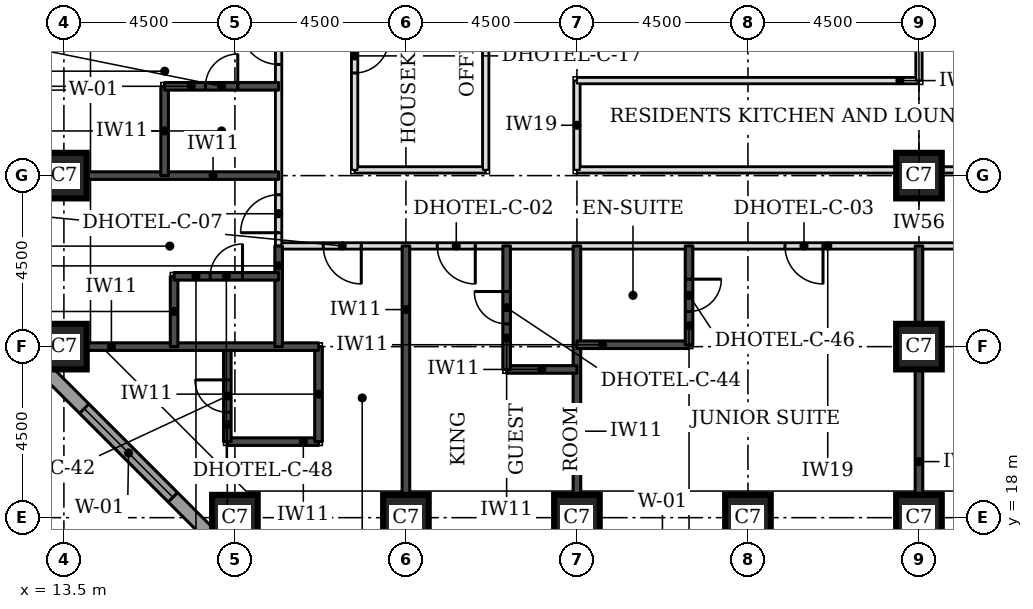
"""IFC4 building model, lengths in metres.
Left out: names, types, materials, properties, quantities, classifications, styles, units other than length and angle.
Written with IfcOpenShell. Run it as: python <this file> out.ifc"""

import sys

from ifc_helpers import new_model, si_unit, direction, frame, frame_2d, origin, origin_2d, place, context, subcontext, project, spatial, rectangle, extrude, element, fill, save


model = new_model("IFC4")
c1 = context("Model", 3, precision=1e-05, world=origin(), true_north=direction((0.0, 1.0)))
c2 = subcontext(c1, "Body", "Model", "MODEL_VIEW")
j1 = project(units=[si_unit("LENGTHUNIT", "METRE"), si_unit("PLANEANGLEUNIT", "RADIAN")], contexts=[c1])
p1 = place(None, origin())
s1 = spatial("IfcSite", under=j1, at=p1, CompositionType="ELEMENT")
p2 = place(p1, origin())
s2 = spatial("IfcBuilding", under=s1, at=p2, CompositionType="ELEMENT")
p3 = place(p2, frame((0.0, 0.0, 33.0)))
s3 = spatial("IfcBuildingStorey", under=s2, at=p3, CompositionType="ELEMENT", Elevation=33.0)
for number, where, z_axis, x_axis in (
    (1, (18.0, 18.0, 0.0), (0.0, 0.0, 1.0), (1.0, 0.0, 0.0)),
    (2, (22.5, 18.0, 0.0), (0.0, 0.0, 1.0), (1.0, 0.0, 0.0)),
    (3, (27.0, 18.0, 0.0), (0.0, 0.0, 1.0), (1.0, 0.0, 0.0)),
    (4, (31.5, 18.0, 0.0), (0.0, 0.0, 1.0), (1.0, 0.0, 0.0)),
    (5, (36.0, 18.0, 0.0), (0.0, 0.0, 1.0), (1.0, 0.0, 0.0)),
    (6, (13.5, 22.5, 0.0), (0.0, 0.0, 1.0), (1.0, 0.0, 0.0)),
    (7, (36.0, 22.5, 0.0), (0.0, 0.0, 1.0), (1.0, 0.0, 0.0)),
    (8, (13.5, 27.0, 0.0), (0.0, 0.0, 1.0), (1.0, 0.0, 0.0)),
    (9, (36.0, 27.0, 0.0), (0.0, 0.0, 1.0), (1.0, 0.0, 0.0)),
):
    element("IfcColumn", number, at=place(p3, frame(where, z_axis=z_axis, x_axis=x_axis)), inside=s3, PredefinedType="COLUMN", context=c2, shape_type="SweptSolid", body=[
        extrude(rectangle(XDim=1.2, YDim=1.2, at=origin_2d()), origin(), (0.0, 0.0, 1.0), 3.3),
    ])
p4 = place(p3, frame((12.674, 22.23, 0.0), z_axis=(0.0, 0.0, 1.0), x_axis=(0.707106781187, -0.707106781187, 0.0)))
e10 = element("IfcWall", 10, at=p4, inside=s3, PredefinedType="STANDARD", context=c2, shape_type="SweptSolid", body=[
    extrude(rectangle(XDim=7.151, YDim=0.35, at=frame_2d((3.576, 0.0))), origin(), (0.0, 0.0, 1.0), 3.055),
])
p5 = place(p4, frame((1.926, 0.0, 0.8)))
e11 = element("IfcOpeningElement", 11, at=p5, cuts=e10, PredefinedType="OPENING", context=c2, shape_type="SweptSolid", body=[
    extrude(rectangle(XDim=3.3, YDim=1.5, at=frame_2d((1.65, 0.75))), frame((0.0, 0.185, 0.0), z_axis=(0.0, -1.0, 0.0), x_axis=(1.0, 0.0, 0.0)), (0.0, 0.0, 1.0), 0.37),
])
p6 = place(p3, frame((19.15, 25.15, 0.0), z_axis=(0.0, 0.0, 1.0), x_axis=(1.0, 0.0, 0.0)))
e12 = element("IfcWall", 12, at=p6, inside=s3, PredefinedType="PARTITIONING", context=c2, shape_type="SweptSolid", body=[
    extrude(rectangle(XDim=33.7, YDim=0.15, at=frame_2d((16.85, 0.0))), origin(), (0.0, 0.0, 1.0), 3.08),
])
p7 = place(p6, frame((4.175, 0.0, 0.0)))
e13 = element("IfcOpeningElement", 13, at=p7, cuts=e12, PredefinedType="OPENING", context=c2, shape_type="SweptSolid", body=[
    extrude(rectangle(XDim=1.0, YDim=2.1, at=frame_2d((0.5, 1.05))), frame((0.0, 0.085, 0.0), z_axis=(0.0, -1.0, 0.0), x_axis=(1.0, 0.0, 0.0)), (0.0, 0.0, 1.0), 0.17),
])
p8 = place(p6, frame((13.325, 0.0, 0.0)))
e14 = element("IfcOpeningElement", 14, at=p8, cuts=e12, PredefinedType="OPENING", context=c2, shape_type="SweptSolid", body=[
    extrude(rectangle(XDim=1.0, YDim=2.1, at=frame_2d((0.5, 1.05))), frame((0.0, 0.085, 0.0), z_axis=(0.0, -1.0, 0.0), x_axis=(1.0, 0.0, 0.0)), (0.0, 0.0, 1.0), 0.17),
])
p9 = place(p6, frame((19.625, 0.0, 0.0)))
e15 = element("IfcOpeningElement", 15, at=p9, cuts=e12, PredefinedType="OPENING", context=c2, shape_type="SweptSolid", body=[
    extrude(rectangle(XDim=1.0, YDim=2.1, at=frame_2d((0.5, 1.05))), frame((0.0, 0.085, 0.0), z_axis=(0.0, -1.0, 0.0), x_axis=(1.0, 0.0, 0.0)), (0.0, 0.0, 1.0), 0.17),
])
p10 = place(p6, frame((28.775, 0.0, 0.0)))
e16 = element("IfcOpeningElement", 16, at=p10, cuts=e12, PredefinedType="OPENING", context=c2, shape_type="SweptSolid", body=[
    extrude(rectangle(XDim=1.0, YDim=2.1, at=frame_2d((0.5, 1.05))), frame((0.0, 0.085, 0.0), z_axis=(0.0, -1.0, 0.0), x_axis=(1.0, 0.0, 0.0)), (0.0, 0.0, 1.0), 0.17),
])
p11 = place(p6, frame((1.175, 0.0, 0.0)))
e17 = element("IfcOpeningElement", 17, at=p11, cuts=e12, PredefinedType="OPENING", context=c2, shape_type="SweptSolid", body=[
    extrude(rectangle(XDim=1.0, YDim=2.1, at=frame_2d((0.5, 1.05))), frame((0.0, 0.085, 0.0), z_axis=(0.0, -1.0, 0.0), x_axis=(1.0, 0.0, 0.0)), (0.0, 0.0, 1.0), 0.17),
])
p12 = place(p6, frame((31.525, 0.0, 0.0)))
e18 = element("IfcOpeningElement", 18, at=p12, cuts=e12, PredefinedType="OPENING", context=c2, shape_type="SweptSolid", body=[
    extrude(rectangle(XDim=1.0, YDim=2.1, at=frame_2d((0.5, 1.05))), frame((0.0, 0.085, 0.0), z_axis=(0.0, -1.0, 0.0), x_axis=(1.0, 0.0, 0.0)), (0.0, 0.0, 1.0), 0.17),
])
p13 = place(p3, frame((19.15, 25.15, 0.0), z_axis=(0.0, 0.0, 1.0), x_axis=(0.0, 1.0, 0.0)))
e19 = element("IfcWall", 19, at=p13, inside=s3, PredefinedType="PARTITIONING", context=c2, shape_type="SweptSolid", body=[
    extrude(rectangle(XDim=24.35, YDim=0.15, at=frame_2d((12.175, 0.0))), origin(), (0.0, 0.0, 1.0), 3.08),
])
p14 = place(p13, frame((0.347, 0.0, 0.0)))
e20 = element("IfcOpeningElement", 20, at=p14, cuts=e19, PredefinedType="OPENING", context=c2, shape_type="SweptSolid", body=[
    extrude(rectangle(XDim=1.0, YDim=2.1, at=frame_2d((0.5, 1.05))), frame((0.0, 0.085, 0.0), z_axis=(0.0, -1.0, 0.0), x_axis=(1.0, 0.0, 0.0)), (0.0, 0.0, 1.0), 0.17),
])
p15 = place(p13, frame((4.775, 0.0, 0.0)))
e21 = element("IfcOpeningElement", 21, at=p15, cuts=e19, PredefinedType="OPENING", context=c2, shape_type="SweptSolid", body=[
    extrude(rectangle(XDim=1.0, YDim=2.1, at=frame_2d((0.5, 1.05))), frame((0.0, 0.085, 0.0), z_axis=(0.0, -1.0, 0.0), x_axis=(1.0, 0.0, 0.0)), (0.0, 0.0, 1.0), 0.17),
])
p16 = place(p13, frame((7.175, 0.0, 0.0)))
e22 = element("IfcOpeningElement", 22, at=p16, cuts=e19, PredefinedType="OPENING", context=c2, shape_type="SweptSolid", body=[
    extrude(rectangle(XDim=1.0, YDim=2.1, at=frame_2d((0.5, 1.05))), frame((0.0, 0.085, 0.0), z_axis=(0.0, -1.0, 0.0), x_axis=(1.0, 0.0, 0.0)), (0.0, 0.0, 1.0), 0.17),
])
p17 = place(p13, frame((13.75, 0.0, 0.0)))
e23 = element("IfcOpeningElement", 23, at=p17, cuts=e19, PredefinedType="OPENING", context=c2, shape_type="SweptSolid", body=[
    extrude(rectangle(XDim=1.0, YDim=2.1, at=frame_2d((0.5, 1.05))), frame((0.0, 0.085, 0.0), z_axis=(0.0, -1.0, 0.0), x_axis=(1.0, 0.0, 0.0)), (0.0, 0.0, 1.0), 0.17),
])
p18 = place(p13, frame((16.175, 0.0, 0.0)))
e24 = element("IfcOpeningElement", 24, at=p18, cuts=e19, PredefinedType="OPENING", context=c2, shape_type="SweptSolid", body=[
    extrude(rectangle(XDim=1.0, YDim=2.1, at=frame_2d((0.5, 1.05))), frame((0.0, 0.085, 0.0), z_axis=(0.0, -1.0, 0.0), x_axis=(1.0, 0.0, 0.0)), (0.0, 0.0, 1.0), 0.17),
])
p19 = place(p13, frame((22.775, 0.0, 0.0)))
e25 = element("IfcOpeningElement", 25, at=p19, cuts=e19, PredefinedType="OPENING", context=c2, shape_type="SweptSolid", body=[
    extrude(rectangle(XDim=1.0, YDim=2.1, at=frame_2d((0.5, 1.05))), frame((0.0, 0.085, 0.0), z_axis=(0.0, -1.0, 0.0), x_axis=(1.0, 0.0, 0.0)), (0.0, 0.0, 1.0), 0.17),
])
p20 = place(p3, frame((21.15, 27.15, 0.0), z_axis=(0.0, 0.0, 1.0), x_axis=(1.0, 0.0, 0.0)))
e26 = element("IfcWall", 26, at=p20, inside=s3, PredefinedType="PARTITIONING", context=c2, shape_type="SweptSolid", body=[
    extrude(rectangle(XDim=3.45, YDim=0.15, at=frame_2d((1.725, 0.0))), origin(), (0.0, 0.0, 1.0), 3.08),
])
p21 = place(p3, frame((21.15, 27.15, 0.0), z_axis=(0.0, 0.0, 1.0), x_axis=(0.0, 1.0, 0.0)))
e27 = element("IfcWall", 27, at=p21, inside=s3, PredefinedType="PARTITIONING", context=c2, shape_type="SweptSolid", body=[
    extrude(rectangle(XDim=15.85, YDim=0.15, at=frame_2d((7.925, 0.0))), origin(), (0.0, 0.0, 1.0), 3.08),
])
p22 = place(p21, frame((2.55, 0.0, 0.0)))
e28 = element("IfcOpeningElement", 28, at=p22, cuts=e27, PredefinedType="OPENING", context=c2, shape_type="SweptSolid", body=[
    extrude(rectangle(XDim=0.9, YDim=2.1, at=frame_2d((0.45, 1.05))), frame((0.0, 0.085, 0.0), z_axis=(0.0, -1.0, 0.0), x_axis=(1.0, 0.0, 0.0)), (0.0, 0.0, 1.0), 0.17),
])
p23 = place(p21, frame((9.225, 0.0, 0.0)))
e29 = element("IfcOpeningElement", 29, at=p23, cuts=e27, PredefinedType="OPENING", context=c2, shape_type="SweptSolid", body=[
    extrude(rectangle(XDim=0.9, YDim=2.1, at=frame_2d((0.45, 1.05))), frame((0.0, 0.085, 0.0), z_axis=(0.0, -1.0, 0.0), x_axis=(1.0, 0.0, 0.0)), (0.0, 0.0, 1.0), 0.17),
])
p24 = place(p3, frame((24.6, 27.15, 0.0), z_axis=(0.0, 0.0, 1.0), x_axis=(0.0, 1.0, 0.0)))
e30 = element("IfcWall", 30, at=p24, inside=s3, PredefinedType="PARTITIONING", context=c2, shape_type="SweptSolid", body=[
    extrude(rectangle(XDim=13.35, YDim=0.15, at=frame_2d((6.675, 0.0))), origin(), (0.0, 0.0, 1.0), 3.08),
])
p25 = place(p3, frame((27.0, 27.15, 0.0), z_axis=(0.0, 0.0, 1.0), x_axis=(1.0, 0.0, 0.0)))
e31 = element("IfcWall", 31, at=p25, inside=s3, PredefinedType="PARTITIONING", context=c2, shape_type="SweptSolid", body=[
    extrude(rectangle(XDim=11.5, YDim=0.15, at=frame_2d((5.75, 0.0))), origin(), (0.0, 0.0, 1.0), 3.08),
])
p26 = place(p3, frame((27.0, 27.15, 0.0), z_axis=(0.0, 0.0, 1.0), x_axis=(0.0, 1.0, 0.0)))
e32 = element("IfcWall", 32, at=p26, inside=s3, PredefinedType="PARTITIONING", context=c2, shape_type="SweptSolid", body=[
    extrude(rectangle(XDim=2.35, YDim=0.15, at=frame_2d((1.175, 0.0))), origin(), (0.0, 0.0, 1.0), 3.08),
])
p27 = place(p3, frame((27.0, 29.5, 0.0), z_axis=(0.0, 0.0, 1.0), x_axis=(1.0, 0.0, 0.0)))
e33 = element("IfcWall", 33, at=p27, inside=s3, PredefinedType="PARTITIONING", context=c2, shape_type="SweptSolid", body=[
    extrude(rectangle(XDim=9.0, YDim=0.15, at=frame_2d((4.5, 0.0))), origin(), (0.0, 0.0, 1.0), 3.08),
])
p28 = place(p3, frame((36.0, 29.5, 0.0), z_axis=(0.0, 0.0, 1.0), x_axis=(0.0, 1.0, 0.0)))
e34 = element("IfcWall", 34, at=p28, inside=s3, PredefinedType="PARTITIONING", context=c2, shape_type="SweptSolid", body=[
    extrude(rectangle(XDim=1.95, YDim=0.15, at=frame_2d((0.975, 0.0))), origin(), (0.0, 0.0, 1.0), 2.33),
])
for number, where, z_axis, x_axis in (
    (35, (22.5, 18.6, 0.0), (0.0, 0.0, 1.0), (0.0, 1.0, 0.0)),
    (36, (27.0, 18.6, 0.0), (0.0, 0.0, 1.0), (0.0, 1.0, 0.0)),
    (37, (36.0, 18.6, 0.0), (0.0, 0.0, 1.0), (0.0, 1.0, 0.0)),
):
    element("IfcWall", number, at=place(p3, frame(where, z_axis=z_axis, x_axis=x_axis)), inside=s3, PredefinedType="SOLIDWALL", context=c2, shape_type="SweptSolid", body=[
        extrude(rectangle(XDim=6.55, YDim=0.2, at=frame_2d((3.275, 0.0))), origin(), (0.0, 0.0, 1.0), 3.08),
    ])
p29 = place(p3, frame((17.8, 20.0, 0.0), z_axis=(0.0, 0.0, 1.0), x_axis=(1.0, 0.0, 0.0)))
e38 = element("IfcWall", 38, at=p29, inside=s3, PredefinedType="SOLIDWALL", context=c2, shape_type="SweptSolid", body=[
    extrude(rectangle(XDim=2.4, YDim=0.2, at=frame_2d((1.2, 0.0))), origin(), (0.0, 0.0, 1.0), 3.08),
])
p30 = place(p3, frame((17.8, 20.0, 0.0), z_axis=(0.0, 0.0, 1.0), x_axis=(0.0, 1.0, 0.0)))
e39 = element("IfcWall", 39, at=p30, inside=s3, PredefinedType="SOLIDWALL", context=c2, shape_type="SweptSolid", body=[
    extrude(rectangle(XDim=2.5, YDim=0.2, at=frame_2d((1.25, 0.0))), origin(), (0.0, 0.0, 1.0), 3.08),
])
p31 = place(p30, frame((0.775, 0.0, 0.0)))
e40 = element("IfcOpeningElement", 40, at=p31, cuts=e39, PredefinedType="OPENING", context=c2, shape_type="SweptSolid", body=[
    extrude(rectangle(XDim=0.85, YDim=2.1, at=frame_2d((0.425, 1.05))), frame((0.0, 0.11, 0.0), z_axis=(0.0, -1.0, 0.0), x_axis=(1.0, 0.0, 0.0)), (0.0, 0.0, 1.0), 0.22),
])
p32 = place(p3, frame((20.2, 20.0, 0.0), z_axis=(0.0, 0.0, 1.0), x_axis=(0.0, 1.0, 0.0)))
e41 = element("IfcWall", 41, at=p32, inside=s3, PredefinedType="SOLIDWALL", context=c2, shape_type="SweptSolid", body=[
    extrude(rectangle(XDim=2.5, YDim=0.2, at=frame_2d((1.25, 0.0))), origin(), (0.0, 0.0, 1.0), 3.08),
])
p33 = place(p3, frame((25.15, 21.9, 0.0), z_axis=(0.0, 0.0, 1.0), x_axis=(1.0, 0.0, 0.0)))
e42 = element("IfcWall", 42, at=p33, inside=s3, PredefinedType="SOLIDWALL", context=c2, shape_type="SweptSolid", body=[
    extrude(rectangle(XDim=1.85, YDim=0.2, at=frame_2d((0.925, 0.0))), origin(), (0.0, 0.0, 1.0), 3.08),
])
p34 = place(p3, frame((25.15, 21.9, 0.0), z_axis=(0.0, 0.0, 1.0), x_axis=(0.0, 1.0, 0.0)))
e43 = element("IfcWall", 43, at=p34, inside=s3, PredefinedType="SOLIDWALL", context=c2, shape_type="SweptSolid", body=[
    extrude(rectangle(XDim=3.25, YDim=0.2, at=frame_2d((1.625, 0.0))), origin(), (0.0, 0.0, 1.0), 3.08),
])
p35 = place(p34, frame((1.2, 0.0, 0.0)))
e44 = element("IfcOpeningElement", 44, at=p35, cuts=e43, PredefinedType="OPENING", context=c2, shape_type="SweptSolid", body=[
    extrude(rectangle(XDim=0.85, YDim=2.1, at=frame_2d((0.425, 1.05))), frame((0.0, 0.11, 0.0), z_axis=(0.0, -1.0, 0.0), x_axis=(1.0, 0.0, 0.0)), (0.0, 0.0, 1.0), 0.22),
])
p36 = place(p3, frame((14.1, 22.5, 0.0), z_axis=(0.0, 0.0, 1.0), x_axis=(1.0, 0.0, 0.0)))
e45 = element("IfcWall", 45, at=p36, inside=s3, PredefinedType="SOLIDWALL", context=c2, shape_type="SweptSolid", body=[
    extrude(rectangle(XDim=6.1, YDim=0.2, at=frame_2d((3.05, 0.0))), origin(), (0.0, 0.0, 1.0), 3.08),
])
p37 = place(p3, frame((16.4, 22.5, 0.0), z_axis=(0.0, 0.0, 1.0), x_axis=(0.0, 1.0, 0.0)))
e46 = element("IfcWall", 46, at=p37, inside=s3, PredefinedType="SOLIDWALL", context=c2, shape_type="SweptSolid", body=[
    extrude(rectangle(XDim=1.85, YDim=0.2, at=frame_2d((0.925, 0.0))), origin(), (0.0, 0.0, 1.0), 3.08),
])
p38 = place(p3, frame((19.15, 22.5, 0.0), z_axis=(0.0, 0.0, 1.0), x_axis=(0.0, 1.0, 0.0)))
e47 = element("IfcWall", 47, at=p38, inside=s3, PredefinedType="SOLIDWALL", context=c2, shape_type="SweptSolid", body=[
    extrude(rectangle(XDim=2.65, YDim=0.2, at=frame_2d((1.325, 0.0))), origin(), (0.0, 0.0, 1.0), 3.08),
])
p39 = place(p3, frame((27.0, 22.55, 0.0), z_axis=(0.0, 0.0, 1.0), x_axis=(1.0, 0.0, 0.0)))
e48 = element("IfcWall", 48, at=p39, inside=s3, PredefinedType="SOLIDWALL", context=c2, shape_type="SweptSolid", body=[
    extrude(rectangle(XDim=2.95, YDim=0.2, at=frame_2d((1.475, 0.0))), origin(), (0.0, 0.0, 1.0), 3.08),
])
p40 = place(p3, frame((29.95, 22.55, 0.0), z_axis=(0.0, 0.0, 1.0), x_axis=(0.0, 1.0, 0.0)))
e49 = element("IfcWall", 49, at=p40, inside=s3, PredefinedType="SOLIDWALL", context=c2, shape_type="SweptSolid", body=[
    extrude(rectangle(XDim=2.6, YDim=0.2, at=frame_2d((1.3, 0.0))), origin(), (0.0, 0.0, 1.0), 3.08),
])
p41 = place(p40, frame((0.875, 0.0, 0.0)))
e50 = element("IfcOpeningElement", 50, at=p41, cuts=e49, PredefinedType="OPENING", context=c2, shape_type="SweptSolid", body=[
    extrude(rectangle(XDim=0.85, YDim=2.1, at=frame_2d((0.425, 1.05))), frame((0.0, 0.11, 0.0), z_axis=(0.0, -1.0, 0.0), x_axis=(1.0, 0.0, 0.0)), (0.0, 0.0, 1.0), 0.22),
])
p42 = place(p3, frame((16.4, 24.35, 0.0), z_axis=(0.0, 0.0, 1.0), x_axis=(1.0, 0.0, 0.0)))
e51 = element("IfcWall", 51, at=p42, inside=s3, PredefinedType="SOLIDWALL", context=c2, shape_type="SweptSolid", body=[
    extrude(rectangle(XDim=2.75, YDim=0.2, at=frame_2d((1.375, 0.0))), origin(), (0.0, 0.0, 1.0), 3.08),
])
p43 = place(p42, frame((0.95, 0.0, 0.0)))
e52 = element("IfcOpeningElement", 52, at=p43, cuts=e51, PredefinedType="OPENING", context=c2, shape_type="SweptSolid", body=[
    extrude(rectangle(XDim=0.85, YDim=2.1, at=frame_2d((0.425, 1.05))), frame((0.0, 0.11, 0.0), z_axis=(0.0, -1.0, 0.0), x_axis=(1.0, 0.0, 0.0)), (0.0, 0.0, 1.0), 0.22),
])
p44 = place(p3, frame((14.1, 27.0, 0.0), z_axis=(0.0, 0.0, 1.0), x_axis=(1.0, 0.0, 0.0)))
e53 = element("IfcWall", 53, at=p44, inside=s3, PredefinedType="SOLIDWALL", context=c2, shape_type="SweptSolid", body=[
    extrude(rectangle(XDim=5.05, YDim=0.2, at=frame_2d((2.525, 0.0))), origin(), (0.0, 0.0, 1.0), 3.08),
])
p45 = place(p3, frame((16.15, 27.0, 0.0), z_axis=(0.0, 0.0, 1.0), x_axis=(0.0, 1.0, 0.0)))
e54 = element("IfcWall", 54, at=p45, inside=s3, PredefinedType="SOLIDWALL", context=c2, shape_type="SweptSolid", body=[
    extrude(rectangle(XDim=2.35, YDim=0.2, at=frame_2d((1.175, 0.0))), origin(), (0.0, 0.0, 1.0), 3.08),
])
p46 = place(p3, frame((16.15, 29.35, 0.0), z_axis=(0.0, 0.0, 1.0), x_axis=(1.0, 0.0, 0.0)))
e55 = element("IfcWall", 55, at=p46, inside=s3, PredefinedType="SOLIDWALL", context=c2, shape_type="SweptSolid", body=[
    extrude(rectangle(XDim=3.0, YDim=0.2, at=frame_2d((1.5, 0.0))), origin(), (0.0, 0.0, 1.0), 3.08),
])
p47 = place(p46, frame((1.075, 0.0, 0.0)))
e56 = element("IfcOpeningElement", 56, at=p47, cuts=e55, PredefinedType="OPENING", context=c2, shape_type="SweptSolid", body=[
    extrude(rectangle(XDim=0.85, YDim=2.1, at=frame_2d((0.425, 1.05))), frame((0.0, 0.11, 0.0), z_axis=(0.0, -1.0, 0.0), x_axis=(1.0, 0.0, 0.0)), (0.0, 0.0, 1.0), 0.22),
])
p48 = place(p5, origin())
e57 = element("IfcWindow", 57, at=p48, inside=s3, PartitioningType="SINGLE_PANEL", PredefinedType="WINDOW", context=c2, shape_type="SweptSolid", body=[
    extrude(rectangle(XDim=3.3, YDim=1.5, at=frame_2d((1.65, 0.75))), frame((0.0, 0.085, 0.0), z_axis=(0.0, -1.0, 0.0), x_axis=(1.0, 0.0, 0.0)), (0.0, 0.0, 1.0), 0.06),
])
fill(e11, e57)
p49 = place(p7, frame((1.0, 0.0, 0.0), z_axis=(0.0, 0.0, 1.0), x_axis=(-1.0, 0.0, 0.0)))
e58 = element("IfcDoor", 58, at=p49, inside=s3, OperationType="SINGLE_SWING_LEFT", PredefinedType="DOOR", context=c2, shape_type="SweptSolid", body=[
    extrude(rectangle(XDim=1.0, YDim=2.1, at=frame_2d((0.5, 1.05))), frame((0.0, 0.025, 0.0), z_axis=(0.0, -1.0, 0.0), x_axis=(1.0, 0.0, 0.0)), (0.0, 0.0, 1.0), 0.05),
])
fill(e13, e58)
p50 = place(p35, origin())
e59 = element("IfcDoor", 59, at=p50, inside=s3, OperationType="SINGLE_SWING_RIGHT", PredefinedType="DOOR", context=c2, shape_type="SweptSolid", body=[
    extrude(rectangle(XDim=0.85, YDim=2.1, at=frame_2d((0.425, 1.05))), frame((0.0, 0.025, 0.0), z_axis=(0.0, -1.0, 0.0), x_axis=(1.0, 0.0, 0.0)), (0.0, 0.0, 1.0), 0.05),
])
fill(e44, e59)
p51 = place(p8, frame((1.0, 0.0, 0.0), z_axis=(0.0, 0.0, 1.0), x_axis=(-1.0, 0.0, 0.0)))
e60 = element("IfcDoor", 60, at=p51, inside=s3, OperationType="SINGLE_SWING_LEFT", PredefinedType="DOOR", context=c2, shape_type="SweptSolid", body=[
    extrude(rectangle(XDim=1.0, YDim=2.1, at=frame_2d((0.5, 1.05))), frame((0.0, 0.025, 0.0), z_axis=(0.0, -1.0, 0.0), x_axis=(1.0, 0.0, 0.0)), (0.0, 0.0, 1.0), 0.05),
])
fill(e14, e60)
p52 = place(p41, frame((0.85, 0.0, 0.0), z_axis=(0.0, 0.0, 1.0), x_axis=(-1.0, 0.0, 0.0)))
e61 = element("IfcDoor", 61, at=p52, inside=s3, OperationType="SINGLE_SWING_LEFT", PredefinedType="DOOR", context=c2, shape_type="SweptSolid", body=[
    extrude(rectangle(XDim=0.85, YDim=2.1, at=frame_2d((0.425, 1.05))), frame((0.0, 0.025, 0.0), z_axis=(0.0, -1.0, 0.0), x_axis=(1.0, 0.0, 0.0)), (0.0, 0.0, 1.0), 0.05),
])
fill(e50, e61)
p53 = place(p14, origin())
e62 = element("IfcDoor", 62, at=p53, inside=s3, OperationType="SINGLE_SWING_LEFT", PredefinedType="DOOR", context=c2, shape_type="SweptSolid", body=[
    extrude(rectangle(XDim=1.0, YDim=2.1, at=frame_2d((0.5, 1.05))), frame((0.0, 0.025, 0.0), z_axis=(0.0, -1.0, 0.0), x_axis=(1.0, 0.0, 0.0)), (0.0, 0.0, 1.0), 0.05),
])
fill(e20, e62)
p54 = place(p43, origin())
e63 = element("IfcDoor", 63, at=p54, inside=s3, OperationType="SINGLE_SWING_RIGHT", PredefinedType="DOOR", context=c2, shape_type="SweptSolid", body=[
    extrude(rectangle(XDim=0.85, YDim=2.1, at=frame_2d((0.425, 1.05))), frame((0.0, 0.025, 0.0), z_axis=(0.0, -1.0, 0.0), x_axis=(1.0, 0.0, 0.0)), (0.0, 0.0, 1.0), 0.05),
])
fill(e52, e63)
p55 = place(p15, origin())
e64 = element("IfcDoor", 64, at=p55, inside=s3, OperationType="SINGLE_SWING_RIGHT", PredefinedType="DOOR", context=c2, shape_type="SweptSolid", body=[
    extrude(rectangle(XDim=1.0, YDim=2.1, at=frame_2d((0.5, 1.05))), frame((0.0, 0.025, 0.0), z_axis=(0.0, -1.0, 0.0), x_axis=(1.0, 0.0, 0.0)), (0.0, 0.0, 1.0), 0.05),
])
fill(e21, e64)
p56 = place(p47, origin())
e65 = element("IfcDoor", 65, at=p56, inside=s3, OperationType="SINGLE_SWING_RIGHT", PredefinedType="DOOR", context=c2, shape_type="SweptSolid", body=[
    extrude(rectangle(XDim=0.85, YDim=2.1, at=frame_2d((0.425, 1.05))), frame((0.0, 0.025, 0.0), z_axis=(0.0, -1.0, 0.0), x_axis=(1.0, 0.0, 0.0)), (0.0, 0.0, 1.0), 0.05),
])
fill(e56, e65)
p57 = place(p11, frame((1.0, 0.0, 0.0), z_axis=(0.0, 0.0, 1.0), x_axis=(-1.0, 0.0, 0.0)))
e66 = element("IfcDoor", 66, at=p57, inside=s3, OperationType="SINGLE_SWING_LEFT", PredefinedType="DOOR", context=c2, shape_type="SweptSolid", body=[
    extrude(rectangle(XDim=1.0, YDim=2.1, at=frame_2d((0.5, 1.05))), frame((0.0, 0.025, 0.0), z_axis=(0.0, -1.0, 0.0), x_axis=(1.0, 0.0, 0.0)), (0.0, 0.0, 1.0), 0.05),
])
fill(e17, e66)
p58 = place(p31, origin())
e67 = element("IfcDoor", 67, at=p58, inside=s3, OperationType="SINGLE_SWING_RIGHT", PredefinedType="DOOR", context=c2, shape_type="SweptSolid", body=[
    extrude(rectangle(XDim=0.85, YDim=2.1, at=frame_2d((0.425, 1.05))), frame((0.0, 0.025, 0.0), z_axis=(0.0, -1.0, 0.0), x_axis=(1.0, 0.0, 0.0)), (0.0, 0.0, 1.0), 0.05),
])
fill(e40, e67)
p59 = place(p22, frame((0.9, 0.0, 0.0), z_axis=(0.0, 0.0, 1.0), x_axis=(-1.0, 0.0, 0.0)))
e68 = element("IfcDoor", 68, at=p59, inside=s3, OperationType="SINGLE_SWING_LEFT", PredefinedType="DOOR", context=c2, shape_type="SweptSolid", body=[
    extrude(rectangle(XDim=0.9, YDim=2.1, at=frame_2d((0.45, 1.05))), frame((0.0, 0.025, 0.0), z_axis=(0.0, -1.0, 0.0), x_axis=(1.0, 0.0, 0.0)), (0.0, 0.0, 1.0), 0.05),
])
fill(e28, e68)
save(model, sys.argv[1])
